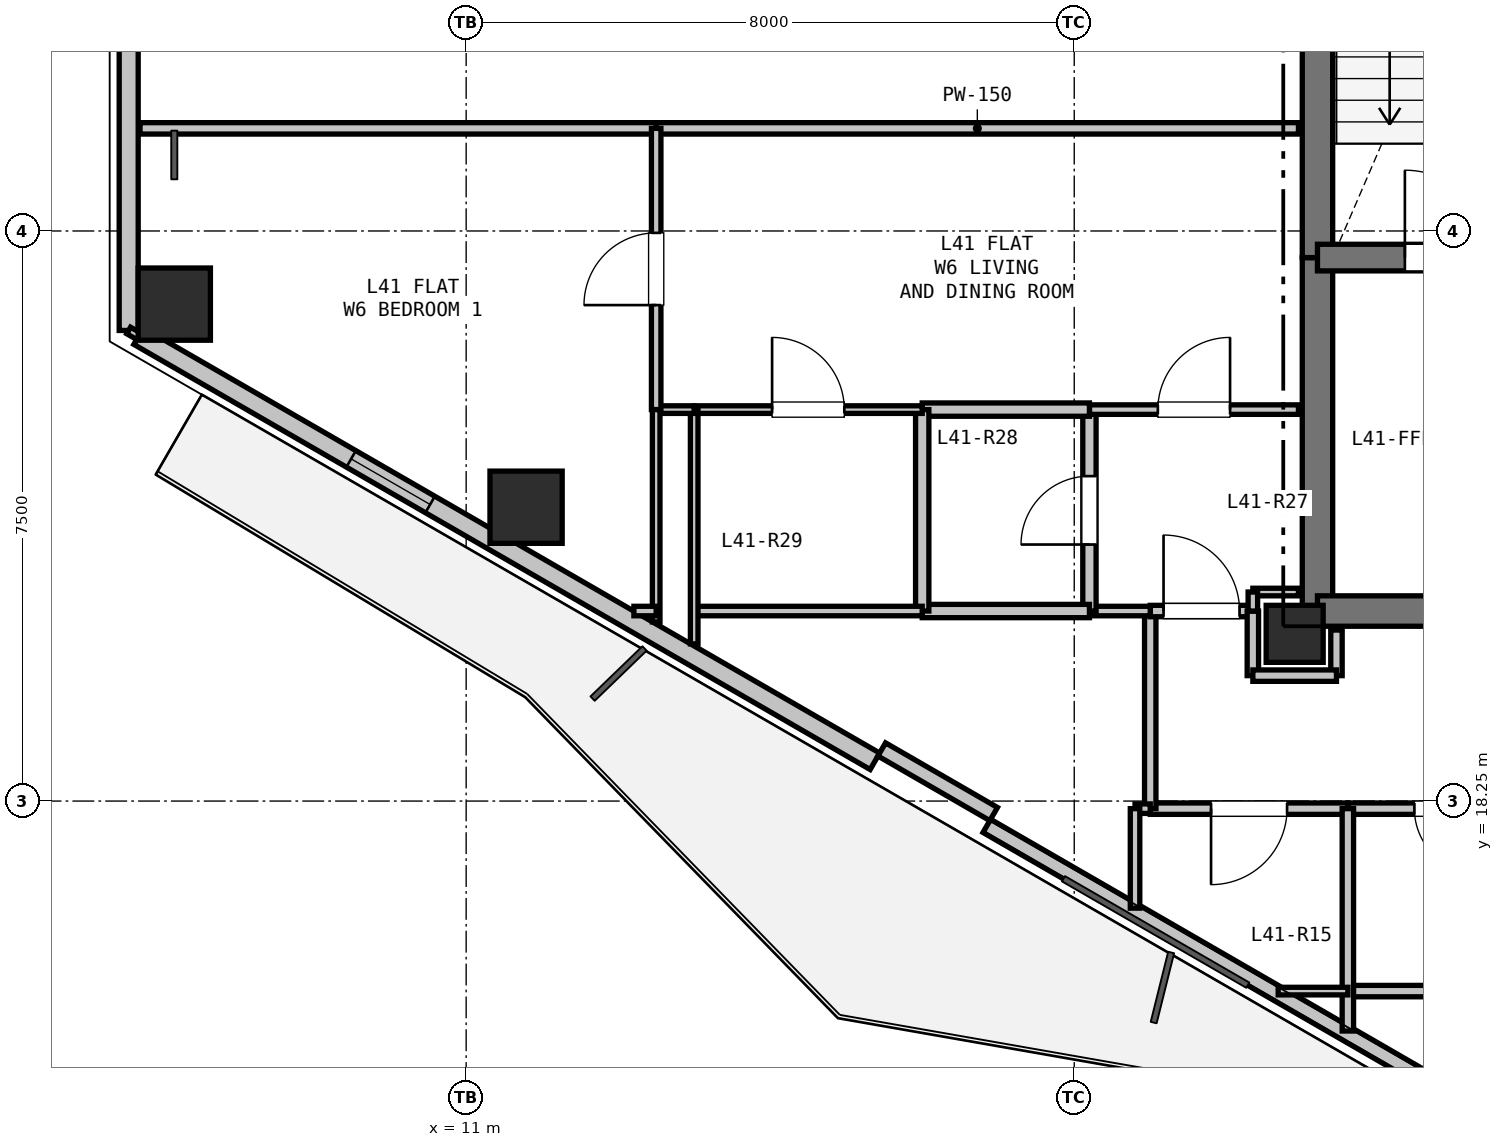
"""IFC4 building model, lengths in metres.
Left out: names, types, materials, properties, quantities, classifications, styles, units other than length and angle.
Written with IfcOpenShell. Run it as: python <this file> out.ifc"""

import sys

from ifc_helpers import new_model, si_unit, direction, frame, frame_2d, origin, origin_2d, place, context, subcontext, project, spatial, rectangle, hollow_rectangle, extrude, element, fill, save


model = new_model("IFC4")
c1 = context("Model", 3, precision=1e-05, world=origin(), true_north=direction((0.0, 1.0)))
c2 = subcontext(c1, "Body", "Model", "MODEL_VIEW")
j1 = project(units=[si_unit("LENGTHUNIT", "METRE"), si_unit("PLANEANGLEUNIT", "RADIAN")], contexts=[c1])
p1 = place(None, origin())
s1 = spatial("IfcSite", under=j1, at=p1, CompositionType="ELEMENT")
p2 = place(p1, origin())
s2 = spatial("IfcBuilding", under=s1, at=p2, CompositionType="ELEMENT")
p3 = place(p2, frame((0.0, 0.0, 147.6)))
s3 = spatial("IfcBuildingStorey", under=s2, at=p3, CompositionType="ELEMENT", Elevation=147.6)
p4 = place(p3, frame((21.9, 20.45, 0.0), z_axis=(0.0, 0.0, 1.0), x_axis=(1.0, 0.0, 0.0)))
e1 = element("IfcColumn", 1, at=p4, inside=s3, PredefinedType="COLUMN", context=c2, shape_type="SweptSolid", body=[
    extrude(rectangle(XDim=0.75, YDim=0.75, at=origin_2d()), origin(), (0.0, 0.0, 1.0), 3.3),
])
for number, where, z_axis, x_axis in (
    (2, (11.788, 22.116, 0.0), (0.0, 0.0, 1.0), (1.0, 0.0, 0.0)),
    (3, (7.16, 24.788, 0.0), (0.0, 0.0, 1.0), (1.0, 0.0, 0.0)),
):
    element("IfcColumn", number, at=place(p3, frame(where, z_axis=z_axis, x_axis=x_axis)), inside=s3, PredefinedType="COLUMN", context=c2, shape_type="SweptSolid", body=[
        extrude(hollow_rectangle(XDim=0.95, YDim=0.95, WallThickness=0.028, at=origin_2d()), origin(), (0.0, 0.0, 1.0), 3.3),
    ])
p5 = place(p3, frame((6.56, 24.441, 0.0), z_axis=(0.0, 0.0, 1.0), x_axis=(0.0, 1.0, 0.0)))
e4 = element("IfcWall", 4, at=p5, inside=s3, PredefinedType="SOLIDWALL", context=c2, shape_type="SweptSolid", body=[
    extrude(rectangle(XDim=4.617, YDim=0.25, at=frame_2d((2.309, 0.0))), origin(), (0.0, 0.0, 1.0), 2.68),
])
p6 = place(p3, frame((26.931, 12.68, 0.0), z_axis=(0.0, 0.0, 1.0), x_axis=(-0.866026619769, 0.499997893847, 0.0)))
e5 = element("IfcWall", 5, at=p6, inside=s3, PredefinedType="PARAPET", context=c2, shape_type="SweptSolid", body=[
    extrude(rectangle(XDim=10.486, YDim=0.2, at=frame_2d((5.243, 0.0))), origin(), (0.0, 0.0, 1.0), 0.2),
])
p7 = place(p3, frame((16.378, 18.773, 0.0), z_axis=(0.0, 0.0, 1.0), x_axis=(-0.866027848477, 0.499995765644, 0.0)))
e6 = element("IfcWall", 6, at=p7, inside=s3, PredefinedType="SOLIDWALL", context=c2, shape_type="SweptSolid", body=[
    extrude(rectangle(XDim=11.186, YDim=0.25, at=frame_2d((5.593, 0.0))), origin(), (0.0, 0.0, 1.0), 2.68),
])
p8 = place(p7, frame((6.757, 0.0, 0.9)))
e7 = element("IfcOpeningElement", 7, at=p8, cuts=e6, PredefinedType="OPENING", context=c2, shape_type="SweptSolid", body=[
    extrude(rectangle(XDim=1.2, YDim=1.4, at=frame_2d((0.6, 0.7))), frame((0.0, 0.135, 0.0), z_axis=(0.0, -1.0, 0.0), x_axis=(1.0, 0.0, 0.0)), (0.0, 0.0, 1.0), 0.27),
])
p9 = place(p3, frame((17.94, 18.079, 0.0), z_axis=(0.0, 0.0, 1.0), x_axis=(-0.865989465428, 0.500062241894, 0.0)))
e8 = element("IfcWall", 8, at=p9, inside=s3, PredefinedType="PARAPET", context=c2, shape_type="SweptSolid", body=[
    extrude(rectangle(XDim=1.7, YDim=0.2, at=frame_2d((0.85, 0.0))), origin(), (0.0, 0.0, 1.0), 2.68),
])
p10 = place(p3, frame((22.2, 20.75, 0.0), z_axis=(0.0, 0.0, 1.0), x_axis=(0.0, 1.0, 0.0)))
e9 = element("IfcWall", 9, at=p10, inside=s3, PredefinedType="SHEAR", context=c2, shape_type="SweptSolid", body=[
    extrude(rectangle(XDim=4.65, YDim=0.4, at=frame_2d((2.325, 0.0))), origin(), (0.0, 0.0, 1.0), 3.06),
])
p11 = place(p3, frame((22.2, 25.4, 0.0), z_axis=(0.0, 0.0, 1.0), x_axis=(0.0, 1.0, 0.0)))
e10 = element("IfcWall", 10, at=p11, inside=s3, PredefinedType="SHEAR", context=c2, shape_type="SweptSolid", body=[
    extrude(rectangle(XDim=7.35, YDim=0.4, at=frame_2d((3.675, 0.0))), origin(), (0.0, 0.0, 1.0), 3.06),
])
p12 = place(p3, frame((25.65, 20.75, 0.0), z_axis=(0.0, 0.0, 1.0), x_axis=(-1.0, 0.0, 0.0)))
e11 = element("IfcWall", 11, at=p12, inside=s3, PredefinedType="SHEAR", context=c2, shape_type="SweptSolid", body=[
    extrude(rectangle(XDim=3.45, YDim=0.4, at=frame_2d((1.725, 0.0))), origin(), (0.0, 0.0, 1.0), 3.06),
])
p13 = place(p12, frame((0.65, 0.0, 0.0)))
e12 = element("IfcOpeningElement", 12, at=p13, cuts=e11, PredefinedType="OPENING", context=c2, shape_type="SweptSolid", body=[
    extrude(rectangle(XDim=1.15, YDim=2.15, at=frame_2d((0.575, 1.075))), frame((0.0, 0.21, 0.0), z_axis=(0.0, -1.0, 0.0), x_axis=(1.0, 0.0, 0.0)), (0.0, 0.0, 1.0), 0.42),
])
p14 = place(p3, frame((22.2, 25.4, 0.0), z_axis=(0.0, 0.0, 1.0), x_axis=(1.0, 0.0, 0.0)))
e13 = element("IfcWall", 13, at=p14, inside=s3, PredefinedType="SHEAR", context=c2, shape_type="SweptSolid", body=[
    extrude(rectangle(XDim=3.45, YDim=0.35, at=frame_2d((1.725, 0.0))), origin(), (0.0, 0.0, 1.0), 3.06),
])
p15 = place(p14, frame((1.15, 0.0, 0.0)))
e14 = element("IfcOpeningElement", 14, at=p15, cuts=e13, PredefinedType="OPENING", context=c2, shape_type="SweptSolid", body=[
    extrude(rectangle(XDim=1.15, YDim=2.15, at=frame_2d((0.575, 1.075))), frame((0.0, 0.185, 0.0), z_axis=(0.0, -1.0, 0.0), x_axis=(1.0, 0.0, 0.0)), (0.0, 0.0, 1.0), 0.37),
])
p16 = place(p3, frame((22.45, 19.9, 0.0), z_axis=(0.0, 0.0, 1.0), x_axis=(0.0, 1.0, 0.0)))
e15 = element("IfcWall", 15, at=p16, inside=s3, PredefinedType="PARTITIONING", context=c2, shape_type="SweptSolid", body=[
    extrude(rectangle(XDim=0.6, YDim=0.15, at=frame_2d((0.3, 0.0))), origin(), (0.0, 0.0, 1.0), 2.433),
])
p17 = place(p3, frame((25.2, 18.15, 0.0), z_axis=(0.0, 0.0, 1.0), x_axis=(-1.0, 0.0, 0.0)))
e16 = element("IfcWall", 16, at=p17, inside=s3, PredefinedType="PARTITIONING", context=c2, shape_type="SweptSolid", body=[
    extrude(rectangle(XDim=2.6, YDim=0.15, at=frame_2d((1.3, 0.0))), origin(), (0.0, 0.0, 1.0), 2.433),
])
p18 = place(p17, frame((0.875, 0.0, 0.0)))
e17 = element("IfcOpeningElement", 17, at=p18, cuts=e16, PredefinedType="OPENING", context=c2, shape_type="SweptSolid", body=[
    extrude(rectangle(XDim=0.85, YDim=2.1, at=frame_2d((0.425, 1.05))), frame((0.0, 0.085, 0.0), z_axis=(0.0, -1.0, 0.0), x_axis=(1.0, 0.0, 0.0)), (0.0, 0.0, 1.0), 0.17),
])
p19 = place(p3, frame((22.6, 18.15, 0.0), z_axis=(0.0, 0.0, 1.0), x_axis=(-1.0, 0.0, 0.0)))
e18 = element("IfcWall", 18, at=p19, inside=s3, PredefinedType="PARTITIONING", context=c2, shape_type="SweptSolid", body=[
    extrude(rectangle(XDim=2.6, YDim=0.15, at=frame_2d((1.3, 0.0))), origin(), (0.0, 0.0, 1.0), 3.06),
])
p20 = place(p19, frame((0.8, 0.0, 0.0)))
e19 = element("IfcOpeningElement", 19, at=p20, cuts=e18, PredefinedType="OPENING", context=c2, shape_type="SweptSolid", body=[
    extrude(rectangle(XDim=1.0, YDim=2.15, at=frame_2d((0.5, 1.075))), frame((0.0, 0.085, 0.0), z_axis=(0.0, -1.0, 0.0), x_axis=(1.0, 0.0, 0.0)), (0.0, 0.0, 1.0), 0.17),
])
p21 = place(p3, frame((20.0, 18.15, 0.0), z_axis=(0.0, 0.0, 1.0), x_axis=(0.0, 1.0, 0.0)))
e20 = element("IfcWall", 20, at=p21, inside=s3, PredefinedType="PARTITIONING", context=c2, shape_type="SweptSolid", body=[
    extrude(rectangle(XDim=2.6, YDim=0.15, at=frame_2d((1.3, 0.0))), origin(), (0.0, 0.0, 1.0), 3.06),
])
p22 = place(p3, frame((20.0, 20.75, 0.0), z_axis=(0.0, 0.0, 1.0), x_axis=(1.0, 0.0, 0.0)))
e21 = element("IfcWall", 21, at=p22, inside=s3, PredefinedType="PARTITIONING", context=c2, shape_type="SweptSolid", body=[
    extrude(rectangle(XDim=1.35, YDim=0.15, at=frame_2d((0.675, 0.0))), origin(), (0.0, 0.0, 1.0), 2.433),
])
p23 = place(p22, frame((0.175, 0.0, 0.0)))
e22 = element("IfcOpeningElement", 22, at=p23, cuts=e21, PredefinedType="OPENING", context=c2, shape_type="SweptSolid", body=[
    extrude(rectangle(XDim=1.0, YDim=2.15, at=frame_2d((0.5, 1.075))), frame((0.0, 0.085, 0.0), z_axis=(0.0, -1.0, 0.0), x_axis=(1.0, 0.0, 0.0)), (0.0, 0.0, 1.0), 0.17),
])
p24 = place(p3, frame((21.35, 20.75, 0.0), z_axis=(0.0, 0.0, 1.0), x_axis=(0.0, -1.0, 0.0)))
e23 = element("IfcWall", 23, at=p24, inside=s3, PredefinedType="PARTITIONING", context=c2, shape_type="SweptSolid", body=[
    extrude(rectangle(XDim=0.85, YDim=0.15, at=frame_2d((0.425, 0.0))), origin(), (0.0, 0.0, 1.0), 2.433),
])
p25 = place(p3, frame((21.35, 19.9, 0.0), z_axis=(0.0, 0.0, 1.0), x_axis=(1.0, 0.0, 0.0)))
e24 = element("IfcWall", 24, at=p25, inside=s3, PredefinedType="PARTITIONING", context=c2, shape_type="SweptSolid", body=[
    extrude(rectangle(XDim=1.1, YDim=0.15, at=frame_2d((0.55, 0.0))), origin(), (0.0, 0.0, 1.0), 2.433),
])
p26 = place(p3, frame((20.0, 20.75, 0.0), z_axis=(0.0, 0.0, 1.0), x_axis=(-1.0, 0.0, 0.0)))
e25 = element("IfcWall", 25, at=p26, inside=s3, PredefinedType="PARTITIONING", context=c2, shape_type="SweptSolid", body=[
    extrude(rectangle(XDim=0.8, YDim=0.125, at=frame_2d((0.4, 0.0))), origin(), (0.0, 0.0, 1.0), 3.06),
])
p27 = place(p3, frame((19.2, 20.75, 0.0), z_axis=(0.0, 0.0, 1.0), x_axis=(0.0, 1.0, 0.0)))
e26 = element("IfcWall", 26, at=p27, inside=s3, PredefinedType="PLUMBINGWALL", context=c2, shape_type="SweptSolid", body=[
    extrude(rectangle(XDim=2.65, YDim=0.175, at=frame_2d((1.325, 0.0))), origin(), (0.0, 0.0, 1.0), 2.433),
])
p28 = place(p27, frame((0.875, 0.0, 0.0)))
e27 = element("IfcOpeningElement", 27, at=p28, cuts=e26, PredefinedType="OPENING", context=c2, shape_type="SweptSolid", body=[
    extrude(rectangle(XDim=0.9, YDim=2.1, at=frame_2d((0.45, 1.05))), frame((0.0, 0.097, 0.0), z_axis=(0.0, -1.0, 0.0), x_axis=(1.0, 0.0, 0.0)), (0.0, 0.0, 1.0), 0.195),
])
p29 = place(p3, frame((19.2, 23.4, 0.0), z_axis=(0.0, 0.0, 1.0), x_axis=(1.0, 0.0, 0.0)))
e28 = element("IfcWall", 28, at=p29, inside=s3, PredefinedType="PARTITIONING", context=c2, shape_type="SweptSolid", body=[
    extrude(rectangle(XDim=2.75, YDim=0.125, at=frame_2d((1.375, 0.0))), origin(), (0.0, 0.0, 1.0), 2.585),
])
p30 = place(p29, frame((0.9, 0.0, 0.0)))
e29 = element("IfcOpeningElement", 29, at=p30, cuts=e28, PredefinedType="OPENING", context=c2, shape_type="SweptSolid", body=[
    extrude(rectangle(XDim=0.95, YDim=2.1, at=frame_2d((0.475, 1.05))), frame((0.0, 0.073, 0.0), z_axis=(0.0, -1.0, 0.0), x_axis=(1.0, 0.0, 0.0)), (0.0, 0.0, 1.0), 0.145),
])
p31 = place(p3, frame((21.95, 21.0, 0.0), z_axis=(0.0, 0.0, 1.0), x_axis=(-1.0, 0.0, 0.0)))
e30 = element("IfcWall", 30, at=p31, inside=s3, PredefinedType="PARTITIONING", context=c2, shape_type="SweptSolid", body=[
    extrude(rectangle(XDim=0.6, YDim=0.1, at=frame_2d((0.3, 0.0))), origin(), (0.0, 0.0, 1.0), 2.585),
])
p32 = place(p3, frame((21.35, 21.0, 0.0), z_axis=(0.0, 0.0, 1.0), x_axis=(0.0, -1.0, 0.0)))
e31 = element("IfcWall", 31, at=p32, inside=s3, PredefinedType="PARTITIONING", context=c2, shape_type="SweptSolid", body=[
    extrude(rectangle(XDim=0.25, YDim=0.125, at=frame_2d((0.125, 0.0))), origin(), (0.0, 0.0, 1.0), 3.06),
])
for number, where, z_axis, x_axis in (
    (32, (17.0, 23.4, 0.0), (0.0, 0.0, 1.0), (1.0, 0.0, 0.0)),
    (33, (19.2, 20.75, 0.0), (0.0, 0.0, 1.0), (-1.0, 0.0, 0.0)),
):
    element("IfcWall", number, at=place(p3, frame(where, z_axis=z_axis, x_axis=x_axis)), inside=s3, PredefinedType="PLUMBINGWALL", context=c2, shape_type="SweptSolid", body=[
        extrude(rectangle(XDim=2.2, YDim=0.175, at=frame_2d((1.1, 0.0))), origin(), (0.0, 0.0, 1.0), 3.06),
    ])
p33 = place(p3, frame((17.0, 20.75, 0.0), z_axis=(0.0, 0.0, 1.0), x_axis=(0.0, 1.0, 0.0)))
e34 = element("IfcWall", 34, at=p33, inside=s3, PredefinedType="PLUMBINGWALL", context=c2, shape_type="SweptSolid", body=[
    extrude(rectangle(XDim=2.65, YDim=0.175, at=frame_2d((1.325, 0.0))), origin(), (0.0, 0.0, 1.0), 2.433),
])
p34 = place(p3, frame((14.0, 23.4, 0.0), z_axis=(0.0, 0.0, 1.0), x_axis=(1.0, 0.0, 0.0)))
e35 = element("IfcWall", 35, at=p34, inside=s3, PredefinedType="PARTITIONING", context=c2, shape_type="SweptSolid", body=[
    extrude(rectangle(XDim=3.0, YDim=0.1, at=frame_2d((1.5, 0.0))), origin(), (0.0, 0.0, 1.0), 3.06),
])
p35 = place(p34, frame((1.025, 0.0, 0.0)))
e36 = element("IfcOpeningElement", 36, at=p35, cuts=e35, PredefinedType="OPENING", context=c2, shape_type="SweptSolid", body=[
    extrude(rectangle(XDim=0.95, YDim=2.1, at=frame_2d((0.475, 1.05))), frame((0.0, 0.06, 0.0), z_axis=(0.0, -1.0, 0.0), x_axis=(1.0, 0.0, 0.0)), (0.0, 0.0, 1.0), 0.12),
])
p36 = place(p3, frame((17.0, 20.75, 0.0), z_axis=(0.0, 0.0, 1.0), x_axis=(-1.0, 0.0, 0.0)))
e37 = element("IfcWall", 37, at=p36, inside=s3, PredefinedType="PARTITIONING", context=c2, shape_type="SweptSolid", body=[
    extrude(rectangle(XDim=3.0, YDim=0.125, at=frame_2d((1.5, 0.0))), origin(), (0.0, 0.0, 1.0), 2.365),
])
p37 = place(p3, frame((14.0, 20.318, 0.0), z_axis=(0.0, 0.0, 1.0), x_axis=(0.0, 1.0, 0.0)))
e38 = element("IfcWall", 38, at=p37, inside=s3, PredefinedType="PARTITIONING", context=c2, shape_type="SweptSolid", body=[
    extrude(rectangle(XDim=3.082, YDim=0.1, at=frame_2d((1.541, 0.0))), origin(), (0.0, 0.0, 1.0), 2.365),
])
p38 = place(p3, frame((25.2, 15.75, 0.0), z_axis=(0.0, 0.0, 1.0), x_axis=(-1.0, 0.0, 0.0)))
e39 = element("IfcWall", 39, at=p38, inside=s3, PredefinedType="PARTITIONING", context=c2, shape_type="SweptSolid", body=[
    extrude(rectangle(XDim=2.6, YDim=0.15, at=frame_2d((1.3, 0.0))), origin(), (0.0, 0.0, 1.0), 2.365),
])
p39 = place(p3, frame((22.6, 15.225, 0.0), z_axis=(0.0, 0.0, 1.0), x_axis=(0.0, 1.0, 0.0)))
e40 = element("IfcWall", 40, at=p39, inside=s3, PredefinedType="PARTITIONING", context=c2, shape_type="SweptSolid", body=[
    extrude(rectangle(XDim=2.925, YDim=0.15, at=frame_2d((1.463, 0.0))), origin(), (0.0, 0.0, 1.0), 2.365),
])
p40 = place(p3, frame((19.8, 18.15, 0.0), z_axis=(0.0, 0.0, 1.0), x_axis=(1.0, 0.0, 0.0)))
e41 = element("IfcWall", 41, at=p40, inside=s3, PredefinedType="PARTITIONING", context=c2, shape_type="SweptSolid", body=[
    extrude(rectangle(XDim=0.2, YDim=0.125, at=frame_2d((0.1, 0.0))), origin(), (0.0, 0.0, 1.0), 3.06),
])
p41 = place(p3, frame((22.6, 15.75, 0.0), z_axis=(0.0, 0.0, 1.0), x_axis=(-1.0, 0.0, 0.0)))
e42 = element("IfcWall", 42, at=p41, inside=s3, PredefinedType="PARTITIONING", context=c2, shape_type="SweptSolid", body=[
    extrude(rectangle(XDim=0.917, YDim=0.1, at=frame_2d((0.458, 0.0))), origin(), (0.0, 0.0, 1.0), 2.365),
])
p42 = place(p3, frame((19.8, 16.841, 0.0), z_axis=(0.0, 0.0, 1.0), x_axis=(0.0, 1.0, 0.0)))
e43 = element("IfcWall", 43, at=p42, inside=s3, PredefinedType="PARTITIONING", context=c2, shape_type="SweptSolid", body=[
    extrude(rectangle(XDim=1.309, YDim=0.125, at=frame_2d((0.654, 0.0))), origin(), (0.0, 0.0, 1.0), 2.365),
])
p43 = place(p3, frame((21.95, 27.1, 0.0), z_axis=(0.0, 0.0, 1.0), x_axis=(-1.0, 0.0, 0.0)))
e44 = element("IfcWall", 44, at=p43, inside=s3, PredefinedType="PARTITIONING", context=c2, shape_type="SweptSolid", body=[
    extrude(rectangle(XDim=8.45, YDim=0.15, at=frame_2d((4.225, 0.0))), origin(), (0.0, 0.0, 1.0), 2.585),
])
p44 = place(p3, frame((13.5, 27.1, 0.0), z_axis=(0.0, 0.0, 1.0), x_axis=(-1.0, 0.0, 0.0)))
e45 = element("IfcWall", 45, at=p44, inside=s3, PredefinedType="PARTITIONING", context=c2, shape_type="SweptSolid", body=[
    extrude(rectangle(XDim=6.791, YDim=0.15, at=frame_2d((3.396, 0.0))), origin(), (0.0, 0.0, 1.0), 2.724),
])
p45 = place(p3, frame((14.0, 23.4, 0.0), z_axis=(0.0, 0.0, 1.0), x_axis=(-1.0, 0.0, 0.0)))
e46 = element("IfcWall", 46, at=p45, inside=s3, PredefinedType="PARTITIONING", context=c2, shape_type="SweptSolid", body=[
    extrude(rectangle(XDim=0.5, YDim=0.1, at=frame_2d((0.25, 0.0))), origin(), (0.0, 0.0, 1.0), 3.06),
])
p46 = place(p3, frame((13.5, 23.4, 0.0), z_axis=(0.0, 0.0, 1.0), x_axis=(0.0, 1.0, 0.0)))
e47 = element("IfcWall", 47, at=p46, inside=s3, PredefinedType="PARTITIONING", context=c2, shape_type="SweptSolid", body=[
    extrude(rectangle(XDim=3.7, YDim=0.125, at=frame_2d((1.85, 0.0))), origin(), (0.0, 0.0, 1.0), 3.06),
])
p47 = place(p46, frame((1.375, 0.0, 0.0)))
e48 = element("IfcOpeningElement", 48, at=p47, cuts=e47, PredefinedType="OPENING", context=c2, shape_type="SweptSolid", body=[
    extrude(rectangle(XDim=0.95, YDim=2.1, at=frame_2d((0.475, 1.05))), frame((0.0, 0.073, 0.0), z_axis=(0.0, -1.0, 0.0), x_axis=(1.0, 0.0, 0.0)), (0.0, 0.0, 1.0), 0.145),
])
p48 = place(p3, frame((13.5, 23.4, 0.0), z_axis=(0.0, 0.0, 1.0), x_axis=(0.0, -1.0, 0.0)))
e49 = element("IfcWall", 49, at=p48, inside=s3, PredefinedType="PARTITIONING", context=c2, shape_type="SweptSolid", body=[
    extrude(rectangle(XDim=2.793, YDim=0.1, at=frame_2d((1.396, 0.0))), origin(), (0.0, 0.0, 1.0), 2.365),
])
p49 = place(p3, frame((13.5, 20.75, 0.0), z_axis=(0.0, 0.0, 1.0), x_axis=(-1.0, 0.0, 0.0)))
e50 = element("IfcWall", 50, at=p49, inside=s3, PredefinedType="PARTITIONING", context=c2, shape_type="SweptSolid", body=[
    extrude(rectangle(XDim=0.293, YDim=0.125, at=frame_2d((0.146, 0.0))), origin(), (0.0, 0.0, 1.0), 3.06),
])
p50 = place(p3, frame((6.69, 24.366, 0.0), z_axis=(0.0, 0.0, 1.0), x_axis=(-0.866131372301, 0.499816412211, 0.0)))
e51 = element("IfcWall", 51, at=p50, inside=s3, PredefinedType="PARTITIONING", context=c2, shape_type="SweptSolid", body=[
    extrude(rectangle(XDim=0.15, YDim=0.1, at=frame_2d((0.075, 0.0))), origin(), (0.0, 0.0, 1.0), 3.06),
])
p51 = place(p8, origin())
e52 = element("IfcWindow", 52, at=p51, inside=s3, PartitioningType="SINGLE_PANEL", PredefinedType="WINDOW", context=c2, shape_type="SweptSolid", body=[
    extrude(rectangle(XDim=1.2, YDim=1.4, at=frame_2d((0.6, 0.7))), frame((0.0, 0.03, 0.0), z_axis=(0.0, -1.0, 0.0), x_axis=(1.0, 0.0, 0.0)), (0.0, 0.0, 1.0), 0.06),
])
fill(e7, e52)
p52 = place(p15, origin())
e53 = element("IfcDoor", 53, at=p52, inside=s3, OperationType="SINGLE_SWING_LEFT", PredefinedType="DOOR", context=c2, shape_type="SweptSolid", body=[
    extrude(rectangle(XDim=1.15, YDim=2.15, at=frame_2d((0.575, 1.075))), frame((0.0, 0.025, 0.0), z_axis=(0.0, -1.0, 0.0), x_axis=(1.0, 0.0, 0.0)), (0.0, 0.0, 1.0), 0.05),
])
fill(e14, e53)
p53 = place(p23, origin())
e54 = element("IfcDoor", 54, at=p53, inside=s3, OperationType="SINGLE_SWING_LEFT", PredefinedType="DOOR", context=c2, shape_type="SweptSolid", body=[
    extrude(rectangle(XDim=1.0, YDim=2.15, at=frame_2d((0.5, 1.075))), frame((0.0, 0.025, 0.0), z_axis=(0.0, -1.0, 0.0), x_axis=(1.0, 0.0, 0.0)), (0.0, 0.0, 1.0), 0.05),
])
fill(e22, e54)
p54 = place(p18, origin())
e55 = element("IfcDoor", 55, at=p54, inside=s3, OperationType="SINGLE_SWING_LEFT", PredefinedType="DOOR", context=c2, shape_type="SweptSolid", body=[
    extrude(rectangle(XDim=0.85, YDim=2.1, at=frame_2d((0.425, 1.05))), frame((0.0, 0.025, 0.0), z_axis=(0.0, -1.0, 0.0), x_axis=(1.0, 0.0, 0.0)), (0.0, 0.0, 1.0), 0.05),
])
fill(e17, e55)
p55 = place(p20, origin())
e56 = element("IfcDoor", 56, at=p55, inside=s3, OperationType="SINGLE_SWING_RIGHT", PredefinedType="DOOR", context=c2, shape_type="SweptSolid", body=[
    extrude(rectangle(XDim=1.0, YDim=2.15, at=frame_2d((0.5, 1.075))), frame((0.0, 0.025, 0.0), z_axis=(0.0, -1.0, 0.0), x_axis=(1.0, 0.0, 0.0)), (0.0, 0.0, 1.0), 0.05),
])
fill(e19, e56)
p56 = place(p28, origin())
e57 = element("IfcDoor", 57, at=p56, inside=s3, OperationType="SINGLE_SWING_LEFT", PredefinedType="DOOR", context=c2, shape_type="SweptSolid", body=[
    extrude(rectangle(XDim=0.9, YDim=2.1, at=frame_2d((0.45, 1.05))), frame((0.0, 0.025, 0.0), z_axis=(0.0, -1.0, 0.0), x_axis=(1.0, 0.0, 0.0)), (0.0, 0.0, 1.0), 0.05),
])
fill(e27, e57)
p57 = place(p30, origin())
e58 = element("IfcDoor", 58, at=p57, inside=s3, OperationType="SINGLE_SWING_RIGHT", PredefinedType="DOOR", context=c2, shape_type="SweptSolid", body=[
    extrude(rectangle(XDim=0.95, YDim=2.1, at=frame_2d((0.475, 1.05))), frame((0.0, 0.025, 0.0), z_axis=(0.0, -1.0, 0.0), x_axis=(1.0, 0.0, 0.0)), (0.0, 0.0, 1.0), 0.05),
])
fill(e29, e58)
p58 = place(p35, origin())
e59 = element("IfcDoor", 59, at=p58, inside=s3, OperationType="SINGLE_SWING_LEFT", PredefinedType="DOOR", context=c2, shape_type="SweptSolid", body=[
    extrude(rectangle(XDim=0.95, YDim=2.1, at=frame_2d((0.475, 1.05))), frame((0.0, 0.025, 0.0), z_axis=(0.0, -1.0, 0.0), x_axis=(1.0, 0.0, 0.0)), (0.0, 0.0, 1.0), 0.05),
])
fill(e36, e59)
p59 = place(p47, origin())
e60 = element("IfcDoor", 60, at=p59, inside=s3, OperationType="SINGLE_SWING_LEFT", PredefinedType="DOOR", context=c2, shape_type="SweptSolid", body=[
    extrude(rectangle(XDim=0.95, YDim=2.1, at=frame_2d((0.475, 1.05))), frame((0.0, 0.025, 0.0), z_axis=(0.0, -1.0, 0.0), x_axis=(1.0, 0.0, 0.0)), (0.0, 0.0, 1.0), 0.05),
])
fill(e48, e60)
save(model, sys.argv[1])
